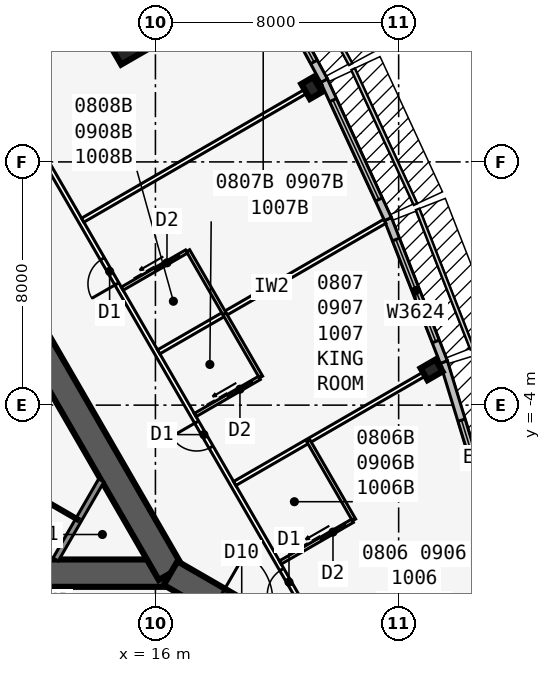
"""IFC4 building model, lengths in metres.
Left out: names, types, materials, properties, quantities, classifications, styles, units other than length and angle.
Written with IfcOpenShell. Run it as: python <this file> out.ifc"""

import sys

from ifc_helpers import new_model, si_unit, direction, frame, frame_2d, origin, origin_2d, place, context, subcontext, project, spatial, rectangle, i_section, extrude, element, fill, save


model = new_model("IFC4")
c1 = context("Model", 3, precision=1e-05, world=origin(), true_north=direction((0.0, 1.0)))
c2 = subcontext(c1, "Body", "Model", "MODEL_VIEW")
j1 = project(units=[si_unit("LENGTHUNIT", "METRE"), si_unit("PLANEANGLEUNIT", "RADIAN")], contexts=[c1])
p1 = place(None, origin())
s1 = spatial("IfcSite", under=j1, at=p1, CompositionType="ELEMENT")
p2 = place(p1, origin())
s2 = spatial("IfcBuilding", under=s1, at=p2, CompositionType="ELEMENT")
p3 = place(p2, frame((0.0, 0.0, 38.7)))
s3 = spatial("IfcBuildingStorey", under=s2, at=p3, CompositionType="ELEMENT", Elevation=38.7)
p4 = place(p3, frame((-16.5, -9.526, 0.0), z_axis=(0.0, 0.0, 1.0), x_axis=(1.0, 0.0, 0.0)))
e1 = element("IfcWall", 1, at=p4, inside=s3, PredefinedType="SHEAR", context=c2, shape_type="SweptSolid", body=[
    extrude(rectangle(XDim=33.0, YDim=0.9, at=frame_2d((16.5, 0.0))), origin(), (0.0, 0.0, 1.0), 3.4),
])
p5 = place(p4, frame((14.05, 0.0, 0.0)))
e2 = element("IfcOpeningElement", 2, at=p5, cuts=e1, PredefinedType="OPENING", context=c2, shape_type="SweptSolid", body=[
    extrude(rectangle(XDim=1.8, YDim=2.13, at=frame_2d((0.9, 1.065))), frame((0.0, 0.46, 0.0), z_axis=(0.0, -1.0, 0.0), x_axis=(1.0, 0.0, 0.0)), (0.0, 0.0, 1.0), 0.92),
])
p6 = place(p3, frame((16.5, -9.526, 0.0), z_axis=(0.0, 0.0, 1.0), x_axis=(-0.499999749417, 0.866025548458, 0.0)))
e3 = element("IfcWall", 3, at=p6, inside=s3, PredefinedType="SHEAR", context=c2, shape_type="SweptSolid", body=[
    extrude(rectangle(XDim=33.0, YDim=0.9, at=frame_2d((16.5, 0.0))), origin(), (0.0, 0.0, 1.0), 3.4),
])
p7 = place(p6, frame((14.15, 0.0, 0.0)))
e4 = element("IfcOpeningElement", 4, at=p7, cuts=e3, PredefinedType="OPENING", context=c2, shape_type="SweptSolid", body=[
    extrude(rectangle(XDim=1.8, YDim=2.13, at=frame_2d((0.9, 1.065))), frame((0.0, 0.46, 0.0), z_axis=(0.0, -1.0, 0.0), x_axis=(1.0, 0.0, 0.0)), (0.0, 0.0, 1.0), 0.92),
])
p8 = place(p6, frame((12.6, 0.0, 0.0)))
e5 = element("IfcOpeningElement", 5, at=p8, cuts=e3, PredefinedType="OPENING", context=c2, shape_type="SweptSolid", body=[
    extrude(rectangle(XDim=1.0, YDim=2.13, at=frame_2d((0.5, 1.065))), frame((0.0, 0.46, 0.0), z_axis=(0.0, -1.0, 0.0), x_axis=(1.0, 0.0, 0.0)), (0.0, 0.0, 1.0), 0.92),
])
p9 = place(p3, frame((16.5, -9.526, 0.0), z_axis=(0.0, 0.0, 1.0), x_axis=(0.866031398331, -0.499989616998, 0.0)))
e6 = element("IfcWall", 6, at=p9, inside=s3, PredefinedType="SHEAR", context=c2, shape_type="SweptSolid", body=[
    extrude(rectangle(XDim=4.746, YDim=0.9, at=frame_2d((2.373, 0.0))), origin(), (0.0, 0.0, 1.0), 3.4),
])
p10 = place(p9, frame((1.8, 0.0, 0.0)))
e7 = element("IfcOpeningElement", 7, at=p10, cuts=e6, PredefinedType="OPENING", context=c2, shape_type="SweptSolid", body=[
    extrude(rectangle(XDim=1.8, YDim=2.13, at=frame_2d((0.9, 1.065))), frame((0.0, 0.46, 0.0), z_axis=(0.0, -1.0, 0.0), x_axis=(1.0, 0.0, 0.0)), (0.0, 0.0, 1.0), 0.92),
])
for number, where, z_axis, x_axis in (
    (8, (25.083, -2.839, 0.0), (0.0, 0.0, 1.0), (-0.5, 0.866, 0.0)),
    (9, (21.137, 6.43, 0.0), (0.0, 0.0, 1.0), (0.866, 0.5, 0.0)),
):
    element("IfcColumn", number, at=place(p3, frame(where, z_axis=z_axis, x_axis=x_axis)), inside=s3, PredefinedType="COLUMN", context=c2, shape_type="SweptSolid", body=[
        extrude(i_section(OverallWidth=0.455, OverallDepth=0.569, WebThickness=0.078, FlangeThickness=0.125, at=origin_2d()), origin(), (0.0, 0.0, 1.0), 3.4),
    ])
p11 = place(p3, frame((15.312, 8.84, 0.0), z_axis=(0.0, 0.0, 1.0), x_axis=(0.866025403784, 0.5, 0.0)))
e10 = element("IfcColumn", 10, at=p11, inside=s3, PredefinedType="COLUMN", context=c2, shape_type="SweptSolid", body=[
    extrude(rectangle(XDim=2.4, YDim=2.4, at=origin_2d()), origin(), (0.0, 0.0, 1.0), 3.4),
])
p12 = place(p3, frame((27.88, -10.429, 0.0), z_axis=(0.0, 0.0, 1.0), x_axis=(-0.2919790669, 0.956424709265, 0.0)))
e11 = element("IfcWall", 11, at=p12, inside=s3, PredefinedType="STANDARD", context=c2, shape_type="SweptSolid", body=[
    extrude(rectangle(XDim=8.211, YDim=0.25, at=frame_2d((4.105, 0.0))), origin(), (0.0, 0.0, 1.0), 3.235),
])
p13 = place(p12, frame((2.006, 0.0, 0.45)))
e12 = element("IfcOpeningElement", 12, at=p13, cuts=e11, PredefinedType="OPENING", context=c2, shape_type="SweptSolid", body=[
    extrude(rectangle(XDim=4.2, YDim=2.4, at=frame_2d((2.1, 1.2))), frame((0.0, 0.135, 0.0), z_axis=(0.0, -1.0, 0.0), x_axis=(1.0, 0.0, 0.0)), (0.0, 0.0, 1.0), 0.27),
])
p14 = place(p3, frame((25.486, -2.584, 0.0), z_axis=(0.0, 0.0, 1.0), x_axis=(-0.364013463868, 0.931393685894, 0.0)))
e13 = element("IfcWall", 13, at=p14, inside=s3, PredefinedType="STANDARD", context=c2, shape_type="SweptSolid", body=[
    extrude(rectangle(XDim=5.058, YDim=0.25, at=frame_2d((2.529, 0.0))), origin(), (0.0, 0.0, 1.0), 3.235),
])
p15 = place(p14, frame((0.729, 0.0, 0.45)))
e14 = element("IfcOpeningElement", 14, at=p15, cuts=e13, PredefinedType="OPENING", context=c2, shape_type="SweptSolid", body=[
    extrude(rectangle(XDim=3.6, YDim=2.4, at=frame_2d((1.8, 1.2))), frame((0.0, 0.135, 0.0), z_axis=(0.0, -1.0, 0.0), x_axis=(1.0, 0.0, 0.0)), (0.0, 0.0, 1.0), 0.27),
])
p16 = place(p3, frame((23.648, 2.119, 0.0), z_axis=(0.0, 0.0, 1.0), x_axis=(-0.419203100754, 0.907892482796, 0.0)))
e15 = element("IfcWall", 15, at=p16, inside=s3, PredefinedType="STANDARD", context=c2, shape_type="SweptSolid", body=[
    extrude(rectangle(XDim=5.021, YDim=0.25, at=frame_2d((2.51, 0.0))), origin(), (0.0, 0.0, 1.0), 3.235),
])
p17 = place(p16, frame((0.71, 0.0, 0.45)))
e16 = element("IfcOpeningElement", 16, at=p17, cuts=e15, PredefinedType="OPENING", context=c2, shape_type="SweptSolid", body=[
    extrude(rectangle(XDim=3.6, YDim=2.4, at=frame_2d((1.8, 1.2))), frame((0.0, 0.135, 0.0), z_axis=(0.0, -1.0, 0.0), x_axis=(1.0, 0.0, 0.0)), (0.0, 0.0, 1.0), 0.27),
])
p18 = place(p3, frame((21.547, 6.671, 0.0), z_axis=(0.0, 0.0, 1.0), x_axis=(-0.473412820489, 0.880840678782, 0.0)))
e17 = element("IfcWall", 17, at=p18, inside=s3, PredefinedType="STANDARD", context=c2, shape_type="SweptSolid", body=[
    extrude(rectangle(XDim=5.002, YDim=0.25, at=frame_2d((2.501, 0.0))), origin(), (0.0, 0.0, 1.0), 3.235),
])
p19 = place(p18, frame((0.701, 0.0, 0.45)))
e18 = element("IfcOpeningElement", 18, at=p19, cuts=e17, PredefinedType="OPENING", context=c2, shape_type="SweptSolid", body=[
    extrude(rectangle(XDim=3.6, YDim=2.4, at=frame_2d((1.8, 1.2))), frame((0.0, 0.135, 0.0), z_axis=(0.0, -1.0, 0.0), x_axis=(1.0, 0.0, 0.0)), (0.0, 0.0, 1.0), 0.27),
])
p20 = place(p3, frame((21.586, -11.885, 0.0), z_axis=(0.0, 0.0, 1.0), x_axis=(-0.500001915564, 0.86602429783, 0.0)))
e19 = element("IfcWall", 19, at=p20, inside=s3, PredefinedType="PARTITIONING", context=c2, shape_type="SweptSolid", body=[
    extrude(rectangle(XDim=42.172, YDim=0.15, at=frame_2d((21.086, 0.0))), origin(), (0.0, 0.0, 1.0), 3.235),
])
p21 = place(p20, frame((1.911, 0.0, 0.0)))
e20 = element("IfcOpeningElement", 20, at=p21, cuts=e19, PredefinedType="OPENING", context=c2, shape_type="SweptSolid", body=[
    extrude(rectangle(XDim=0.95, YDim=2.13, at=frame_2d((0.475, 1.065))), frame((0.0, 0.085, 0.0), z_axis=(0.0, -1.0, 0.0), x_axis=(1.0, 0.0, 0.0)), (0.0, 0.0, 1.0), 0.17),
])
p22 = place(p20, frame((7.511, 0.0, 0.0)))
e21 = element("IfcOpeningElement", 21, at=p22, cuts=e19, PredefinedType="OPENING", context=c2, shape_type="SweptSolid", body=[
    extrude(rectangle(XDim=0.95, YDim=2.13, at=frame_2d((0.475, 1.065))), frame((0.0, 0.085, 0.0), z_axis=(0.0, -1.0, 0.0), x_axis=(1.0, 0.0, 0.0)), (0.0, 0.0, 1.0), 0.17),
])
p23 = place(p20, frame((13.711, 0.0, 0.0)))
e22 = element("IfcOpeningElement", 22, at=p23, cuts=e19, PredefinedType="OPENING", context=c2, shape_type="SweptSolid", body=[
    extrude(rectangle(XDim=0.95, YDim=2.13, at=frame_2d((0.475, 1.065))), frame((0.0, 0.085, 0.0), z_axis=(0.0, -1.0, 0.0), x_axis=(1.0, 0.0, 0.0)), (0.0, 0.0, 1.0), 0.17),
])
p24 = place(p20, frame((21.911, 0.0, 0.0)))
e23 = element("IfcOpeningElement", 23, at=p24, cuts=e19, PredefinedType="OPENING", context=c2, shape_type="SweptSolid", body=[
    extrude(rectangle(XDim=0.95, YDim=2.13, at=frame_2d((0.475, 1.065))), frame((0.0, 0.085, 0.0), z_axis=(0.0, -1.0, 0.0), x_axis=(1.0, 0.0, 0.0)), (0.0, 0.0, 1.0), 0.17),
])
p25 = place(p20, frame((28.711, 0.0, 0.0)))
e24 = element("IfcOpeningElement", 24, at=p25, cuts=e19, PredefinedType="OPENING", context=c2, shape_type="SweptSolid", body=[
    extrude(rectangle(XDim=0.95, YDim=2.13, at=frame_2d((0.475, 1.065))), frame((0.0, 0.085, 0.0), z_axis=(0.0, -1.0, 0.0), x_axis=(1.0, 0.0, 0.0)), (0.0, 0.0, 1.0), 0.17),
])
p26 = place(p20, frame((31.911, 0.0, 0.0)))
e25 = element("IfcOpeningElement", 25, at=p26, cuts=e19, PredefinedType="OPENING", context=c2, shape_type="SweptSolid", body=[
    extrude(rectangle(XDim=0.95, YDim=2.13, at=frame_2d((0.475, 1.065))), frame((0.0, 0.085, 0.0), z_axis=(0.0, -1.0, 0.0), x_axis=(1.0, 0.0, 0.0)), (0.0, 0.0, 1.0), 0.17),
])
p27 = place(p20, frame((39.311, 0.0, 0.0)))
e26 = element("IfcOpeningElement", 26, at=p27, cuts=e19, PredefinedType="OPENING", context=c2, shape_type="SweptSolid", body=[
    extrude(rectangle(XDim=0.95, YDim=2.13, at=frame_2d((0.475, 1.065))), frame((0.0, 0.085, 0.0), z_axis=(0.0, -1.0, 0.0), x_axis=(1.0, 0.0, 0.0)), (0.0, 0.0, 1.0), 0.17),
])
p28 = place(p3, frame((18.608, -6.577, 0.0), z_axis=(0.0, 0.0, 1.0), x_axis=(0.866034818847, 0.499983692279, 0.0)))
e27 = element("IfcWall", 27, at=p28, inside=s3, PredefinedType="PARTITIONING", context=c2, shape_type="SweptSolid", body=[
    extrude(rectangle(XDim=7.82, YDim=0.15, at=frame_2d((3.91, 0.0))), origin(), (0.0, 0.0, 1.0), 2.389),
])
p29 = place(p3, frame((16.108, -2.247, 0.0), z_axis=(0.0, 0.0, 1.0), x_axis=(0.866018881988, 0.500011295912, 0.0)))
e28 = element("IfcWall", 28, at=p29, inside=s3, PredefinedType="PARTITIONING", context=c2, shape_type="SweptSolid", body=[
    extrude(rectangle(XDim=8.585, YDim=0.15, at=frame_2d((4.292, 0.0))), origin(), (0.0, 0.0, 1.0), 2.389),
])
p30 = place(p3, frame((13.608, 2.083, 0.0), z_axis=(0.0, 0.0, 1.0), x_axis=(0.866028232062, 0.499995101247, 0.0)))
e29 = element("IfcWall", 29, at=p30, inside=s3, PredefinedType="PARTITIONING", context=c2, shape_type="SweptSolid", body=[
    extrude(rectangle(XDim=9.043, YDim=0.15, at=frame_2d((4.521, 0.0))), origin(), (0.0, 0.0, 1.0), 2.389),
])
p31 = place(p3, frame((22.533, -7.775, 0.0), z_axis=(0.0, 0.0, 1.0), x_axis=(-0.499990139034, 0.866031096941, 0.0)))
e30 = element("IfcWall", 30, at=p31, inside=s3, PredefinedType="PLUMBINGWALL", context=c2, shape_type="SweptSolid", body=[
    extrude(rectangle(XDim=3.0, YDim=0.12, at=frame_2d((1.5, 0.0))), origin(), (0.0, 0.0, 1.0), 3.235),
])
p32 = place(p3, frame((20.108, -9.175, 0.0), z_axis=(0.0, 0.0, 1.0), x_axis=(0.866035715982, 0.499982138324, 0.0)))
e31 = element("IfcWall", 31, at=p32, inside=s3, PredefinedType="PLUMBINGWALL", context=c2, shape_type="SweptSolid", body=[
    extrude(rectangle(XDim=2.74, YDim=0.12, at=frame_2d((1.37, 0.0))), origin(), (0.0, 0.0, 1.0), 3.235),
])
p33 = place(p32, frame((1.55, 0.0, 0.0)))
e32 = element("IfcOpeningElement", 32, at=p33, cuts=e31, PredefinedType="OPENING", context=c2, shape_type="SweptSolid", body=[
    extrude(rectangle(XDim=0.9, YDim=2.13, at=frame_2d((0.45, 1.065))), frame((0.0, 0.07, 0.0), z_axis=(0.0, -1.0, 0.0), x_axis=(1.0, 0.0, 0.0)), (0.0, 0.0, 1.0), 0.14),
])
p34 = place(p3, frame((19.473, -3.076, 0.0), z_axis=(0.0, 0.0, 1.0), x_axis=(-0.499957262057, 0.866050077142, 0.0)))
e33 = element("IfcWall", 33, at=p34, inside=s3, PredefinedType="PLUMBINGWALL", context=c2, shape_type="SweptSolid", body=[
    extrude(rectangle(XDim=2.4, YDim=0.12, at=frame_2d((1.2, 0.0))), origin(), (0.0, 0.0, 1.0), 3.235),
])
p35 = place(p3, frame((17.308, -4.326, 0.0), z_axis=(0.0, 0.0, 1.0), x_axis=(0.866023955769, 0.500002508028, 0.0)))
e34 = element("IfcWall", 34, at=p35, inside=s3, PredefinedType="PLUMBINGWALL", context=c2, shape_type="SweptSolid", body=[
    extrude(rectangle(XDim=2.44, YDim=0.12, at=frame_2d((1.22, 0.0))), origin(), (0.0, 0.0, 1.0), 3.235),
])
p36 = place(p35, frame((1.25, 0.0, 0.0)))
e35 = element("IfcOpeningElement", 35, at=p36, cuts=e34, PredefinedType="OPENING", context=c2, shape_type="SweptSolid", body=[
    extrude(rectangle(XDim=0.9, YDim=2.13, at=frame_2d((0.45, 1.065))), frame((0.0, 0.07, 0.0), z_axis=(0.0, -1.0, 0.0), x_axis=(1.0, 0.0, 0.0)), (0.0, 0.0, 1.0), 0.14),
])
p37 = place(p3, frame((18.273, -0.997, 0.0), z_axis=(0.0, 0.0, 1.0), x_axis=(-0.500001309137, 0.866024647952, 0.0)))
e36 = element("IfcWall", 36, at=p37, inside=s3, PredefinedType="PLUMBINGWALL", context=c2, shape_type="SweptSolid", body=[
    extrude(rectangle(XDim=2.4, YDim=0.12, at=frame_2d((1.2, 0.0))), origin(), (0.0, 0.0, 1.0), 3.235),
])
p38 = place(p3, frame((14.908, -0.169, 0.0), z_axis=(0.0, 0.0, 1.0), x_axis=(0.866023955769, 0.500002508028, 0.0)))
e37 = element("IfcWall", 37, at=p38, inside=s3, PredefinedType="PLUMBINGWALL", context=c2, shape_type="SweptSolid", body=[
    extrude(rectangle(XDim=2.44, YDim=0.12, at=frame_2d((1.22, 0.0))), origin(), (0.0, 0.0, 1.0), 3.235),
])
p39 = place(p38, frame((1.25, 0.0, 0.0)))
e38 = element("IfcOpeningElement", 38, at=p39, cuts=e37, PredefinedType="OPENING", context=c2, shape_type="SweptSolid", body=[
    extrude(rectangle(XDim=0.9, YDim=2.13, at=frame_2d((0.45, 1.065))), frame((0.0, 0.07, 0.0), z_axis=(0.0, -1.0, 0.0), x_axis=(1.0, 0.0, 0.0)), (0.0, 0.0, 1.0), 0.14),
])
p40 = place(p3, frame((14.219, -6.476, 0.0), z_axis=(0.0, 0.0, 1.0), x_axis=(-0.499952404951, -0.866052881055, 0.0)))
e39 = element("IfcWall", 39, at=p40, inside=s3, PredefinedType="SOLIDWALL", context=c2, shape_type="SweptSolid", body=[
    extrude(rectangle(XDim=3.002, YDim=0.2, at=frame_2d((1.501, 0.0))), origin(), (0.0, 0.0, 1.0), 3.235),
])
p41 = place(p3, frame((13.469, -7.776, 0.0), z_axis=(0.0, 0.0, 1.0), x_axis=(-0.866021898093, 0.500006071987, 0.0)))
e40 = element("IfcWall", 40, at=p41, inside=s3, PredefinedType="PARTITIONING", context=c2, shape_type="SweptSolid", body=[
    extrude(rectangle(XDim=3.775, YDim=0.1, at=frame_2d((1.888, 0.0))), origin(), (0.0, 0.0, 1.0), 3.235),
])
p42 = place(p41, frame((1.815, 0.0, 0.0)))
e41 = element("IfcOpeningElement", 41, at=p42, cuts=e40, PredefinedType="OPENING", context=c2, shape_type="SweptSolid", body=[
    extrude(rectangle(XDim=0.9, YDim=2.13, at=frame_2d((0.45, 1.065))), frame((0.0, 0.06, 0.0), z_axis=(0.0, -1.0, 0.0), x_axis=(1.0, 0.0, 0.0)), (0.0, 0.0, 1.0), 0.12),
])
p43 = place(p13, origin())
e42 = element("IfcWindow", 42, at=p43, inside=s3, PartitioningType="SINGLE_PANEL", PredefinedType="WINDOW", context=c2, shape_type="SweptSolid", body=[
    extrude(rectangle(XDim=4.2, YDim=2.4, at=frame_2d((2.1, 1.2))), frame((0.0, 0.03, 0.0), z_axis=(0.0, -1.0, 0.0), x_axis=(1.0, 0.0, 0.0)), (0.0, 0.0, 1.0), 0.06),
])
fill(e12, e42)
p44 = place(p15, origin())
e43 = element("IfcWindow", 43, at=p44, inside=s3, PartitioningType="SINGLE_PANEL", PredefinedType="WINDOW", context=c2, shape_type="SweptSolid", body=[
    extrude(rectangle(XDim=3.6, YDim=2.4, at=frame_2d((1.8, 1.2))), frame((0.0, 0.03, 0.0), z_axis=(0.0, -1.0, 0.0), x_axis=(1.0, 0.0, 0.0)), (0.0, 0.0, 1.0), 0.06),
])
fill(e14, e43)
p45 = place(p17, origin())
e44 = element("IfcWindow", 44, at=p45, inside=s3, PartitioningType="SINGLE_PANEL", PredefinedType="WINDOW", context=c2, shape_type="SweptSolid", body=[
    extrude(rectangle(XDim=3.6, YDim=2.4, at=frame_2d((1.8, 1.2))), frame((0.0, 0.03, 0.0), z_axis=(0.0, -1.0, 0.0), x_axis=(1.0, 0.0, 0.0)), (0.0, 0.0, 1.0), 0.06),
])
fill(e16, e44)
p46 = place(p19, origin())
e45 = element("IfcWindow", 45, at=p46, inside=s3, PartitioningType="SINGLE_PANEL", PredefinedType="WINDOW", context=c2, shape_type="SweptSolid", body=[
    extrude(rectangle(XDim=3.6, YDim=2.4, at=frame_2d((1.8, 1.2))), frame((0.0, 0.03, 0.0), z_axis=(0.0, -1.0, 0.0), x_axis=(1.0, 0.0, 0.0)), (0.0, 0.0, 1.0), 0.06),
])
fill(e18, e45)
p47 = place(p33, origin())
e46 = element("IfcDoor", 46, at=p47, inside=s3, OperationType="SLIDING_TO_LEFT", PredefinedType="DOOR", context=c2, shape_type="SweptSolid", body=[
    extrude(rectangle(XDim=0.9, YDim=2.13, at=frame_2d((0.45, 1.065))), frame((0.0, 0.025, 0.0), z_axis=(0.0, -1.0, 0.0), x_axis=(1.0, 0.0, 0.0)), (0.0, 0.0, 1.0), 0.05),
])
fill(e32, e46)
p48 = place(p21, origin())
e47 = element("IfcDoor", 47, at=p48, inside=s3, OperationType="SINGLE_SWING_LEFT", PredefinedType="DOOR", context=c2, shape_type="SweptSolid", body=[
    extrude(rectangle(XDim=0.95, YDim=2.13, at=frame_2d((0.475, 1.065))), frame((0.0, 0.025, 0.0), z_axis=(0.0, -1.0, 0.0), x_axis=(1.0, 0.0, 0.0)), (0.0, 0.0, 1.0), 0.05),
])
fill(e20, e47)
p49 = place(p36, origin())
e48 = element("IfcDoor", 48, at=p49, inside=s3, OperationType="SLIDING_TO_LEFT", PredefinedType="DOOR", context=c2, shape_type="SweptSolid", body=[
    extrude(rectangle(XDim=0.9, YDim=2.13, at=frame_2d((0.45, 1.065))), frame((0.0, 0.025, 0.0), z_axis=(0.0, -1.0, 0.0), x_axis=(1.0, 0.0, 0.0)), (0.0, 0.0, 1.0), 0.05),
])
fill(e35, e48)
p50 = place(p22, origin())
e49 = element("IfcDoor", 49, at=p50, inside=s3, OperationType="SINGLE_SWING_RIGHT", PredefinedType="DOOR", context=c2, shape_type="SweptSolid", body=[
    extrude(rectangle(XDim=0.95, YDim=2.13, at=frame_2d((0.475, 1.065))), frame((0.0, 0.025, 0.0), z_axis=(0.0, -1.0, 0.0), x_axis=(1.0, 0.0, 0.0)), (0.0, 0.0, 1.0), 0.05),
])
fill(e21, e49)
p51 = place(p39, origin())
e50 = element("IfcDoor", 50, at=p51, inside=s3, OperationType="SLIDING_TO_LEFT", PredefinedType="DOOR", context=c2, shape_type="SweptSolid", body=[
    extrude(rectangle(XDim=0.9, YDim=2.13, at=frame_2d((0.45, 1.065))), frame((0.0, 0.025, 0.0), z_axis=(0.0, -1.0, 0.0), x_axis=(1.0, 0.0, 0.0)), (0.0, 0.0, 1.0), 0.05),
])
fill(e38, e50)
p52 = place(p23, origin())
e51 = element("IfcDoor", 51, at=p52, inside=s3, OperationType="SINGLE_SWING_LEFT", PredefinedType="DOOR", context=c2, shape_type="SweptSolid", body=[
    extrude(rectangle(XDim=0.95, YDim=2.13, at=frame_2d((0.475, 1.065))), frame((0.0, 0.025, 0.0), z_axis=(0.0, -1.0, 0.0), x_axis=(1.0, 0.0, 0.0)), (0.0, 0.0, 1.0), 0.05),
])
fill(e22, e51)
save(model, sys.argv[1])
